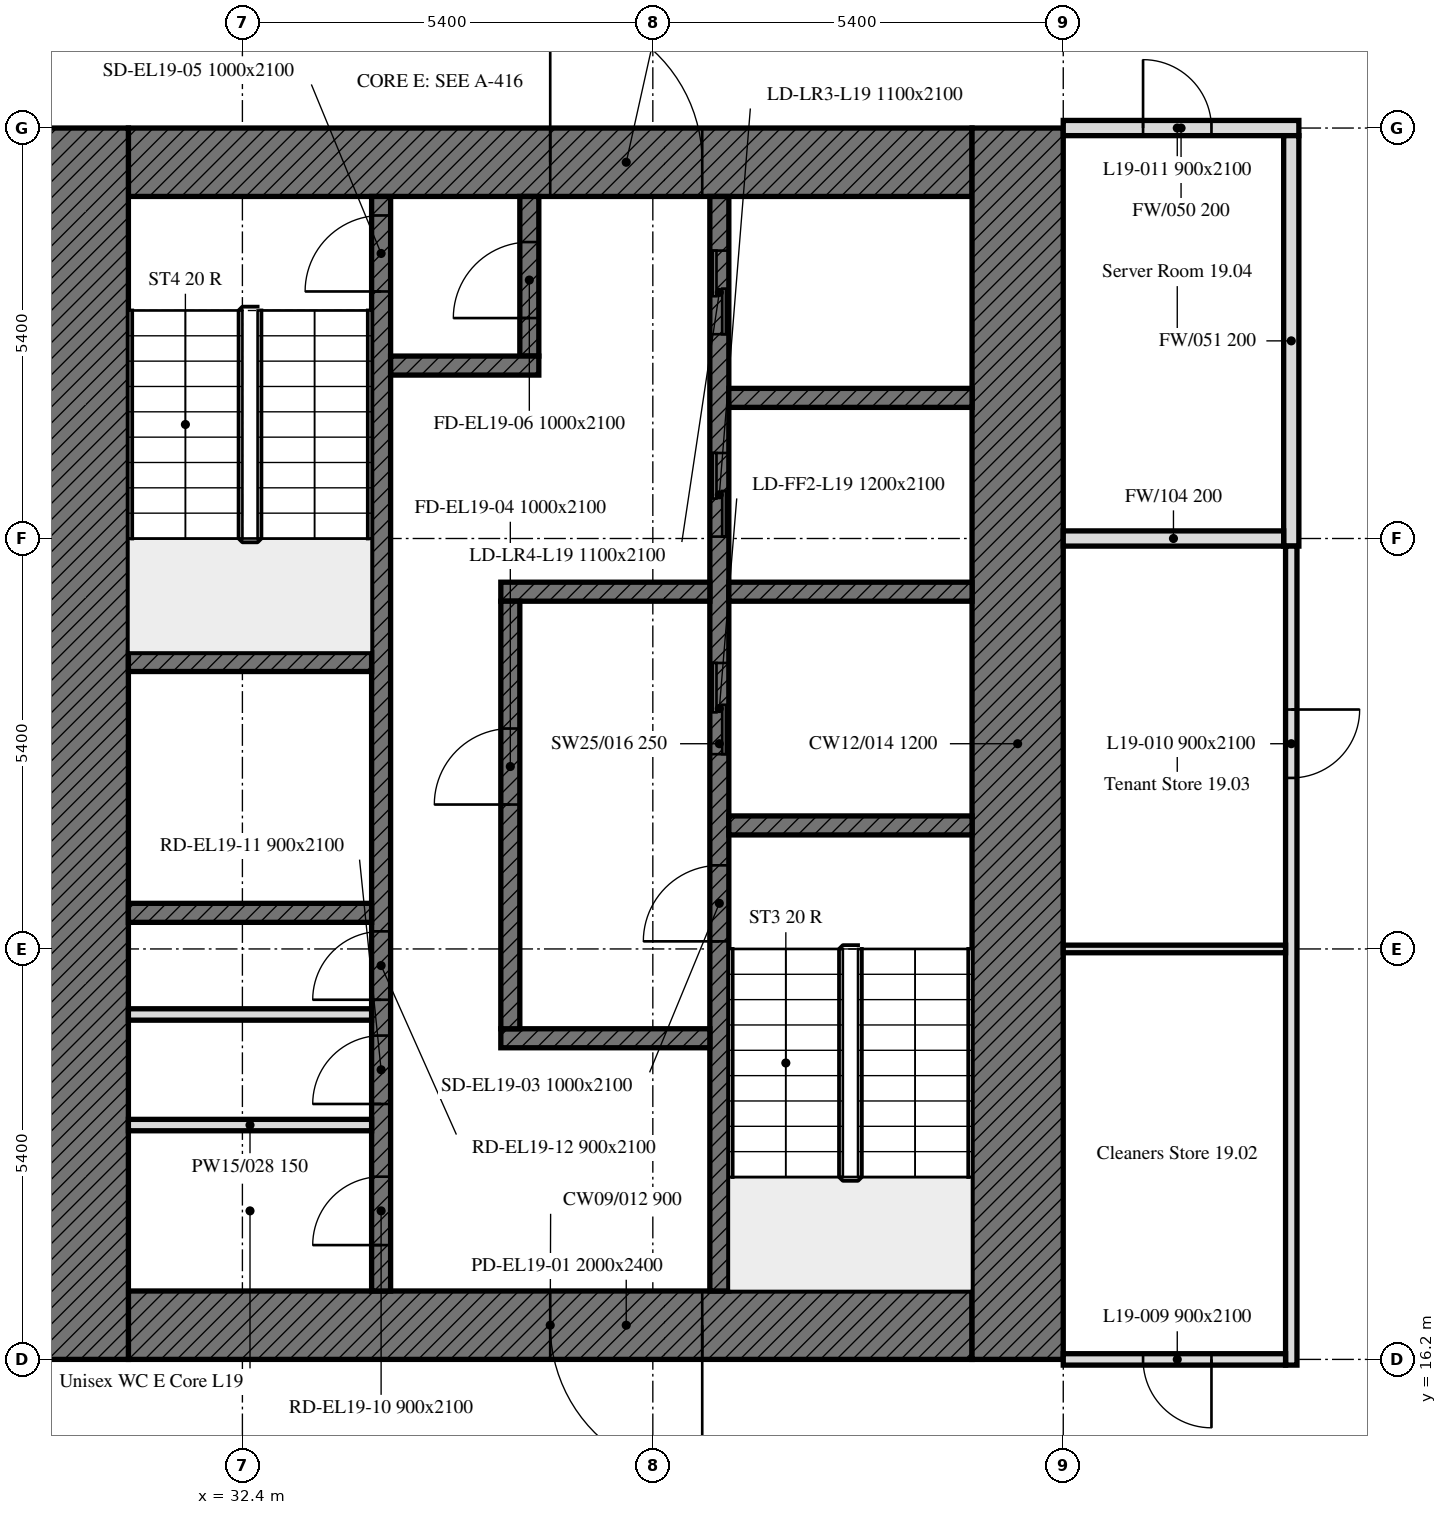
"""IFC4 building model, lengths in metres.
Left out: names, types, materials, properties, quantities, classifications, styles, units other than length and angle.
Written with IfcOpenShell. Run it as: python <this file> out.ifc"""

import sys

from ifc_helpers import new_model, si_unit, direction, frame, frame_2d, origin, place, context, subcontext, project, spatial, rectangle, extrude, element, fill, save


model = new_model("IFC4")
c1 = context("Model", 3, precision=1e-05, world=origin(), true_north=direction((0.0, 1.0)))
c2 = subcontext(c1, "Body", "Model", "MODEL_VIEW")
j1 = project(units=[si_unit("LENGTHUNIT", "METRE"), si_unit("PLANEANGLEUNIT", "RADIAN")], contexts=[c1])
p1 = place(None, origin())
s1 = spatial("IfcSite", under=j1, at=p1, CompositionType="ELEMENT")
p2 = place(p1, origin())
s2 = spatial("IfcBuilding", under=s1, at=p2, CompositionType="ELEMENT")
p3 = place(p2, frame((0.0, 0.0, 84.0)))
s3 = spatial("IfcBuildingStorey", under=s2, at=p3, CompositionType="ELEMENT", Elevation=84.0)
p4 = place(p3, frame((42.0, 16.65, 0.0), z_axis=(0.0, 0.0, 1.0), x_axis=(-1.0, 0.0, 0.0)))
e1 = element("IfcWall", 1, at=p4, inside=s3, PredefinedType="SOLIDWALL", context=c2, shape_type="SweptSolid", body=[
    extrude(rectangle(XDim=11.1, YDim=0.9, at=frame_2d((5.55, 0.0))), origin(), (0.0, 0.0, 1.0), 3.5),
])
p5 = place(p4, frame((3.55, 0.0, 0.0)))
e2 = element("IfcOpeningElement", 2, at=p5, cuts=e1, PredefinedType="OPENING", context=c2, shape_type="SweptSolid", body=[
    extrude(rectangle(XDim=2.0, YDim=2.4, at=frame_2d((1.0, 1.2))), frame((0.0, 0.45, 0.0), z_axis=(0.0, -1.0, 0.0), x_axis=(1.0, 0.0, 0.0)), (0.0, 0.0, 1.0), 0.9),
])
p6 = place(p3, frame((30.9, 31.95, 0.0), z_axis=(0.0, 0.0, 1.0), x_axis=(1.0, 0.0, 0.0)))
e3 = element("IfcWall", 3, at=p6, inside=s3, PredefinedType="SOLIDWALL", context=c2, shape_type="SweptSolid", body=[
    extrude(rectangle(XDim=11.1, YDim=0.9, at=frame_2d((5.55, 0.0))), origin(), (0.0, 0.0, 1.0), 3.5),
])
p7 = place(p6, frame((5.55, 0.0, 0.0)))
e4 = element("IfcOpeningElement", 4, at=p7, cuts=e3, PredefinedType="OPENING", context=c2, shape_type="SweptSolid", body=[
    extrude(rectangle(XDim=2.0, YDim=2.4, at=frame_2d((1.0, 1.2))), frame((0.0, 0.45, 0.0), z_axis=(0.0, -1.0, 0.0), x_axis=(1.0, 0.0, 0.0)), (0.0, 0.0, 1.0), 0.9),
])
for number, where, z_axis, x_axis in (
    (5, (42.6, 32.4, 0.0), (0.0, 0.0, 1.0), (0.0, -1.0, 0.0)),
    (6, (30.3, 16.2, 0.0), (0.0, 0.0, 1.0), (0.0, 1.0, 0.0)),
):
    element("IfcWall", number, at=place(p3, frame(where, z_axis=z_axis, x_axis=x_axis)), inside=s3, PredefinedType="SOLIDWALL", context=c2, shape_type="SweptSolid", body=[
        extrude(rectangle(XDim=16.2, YDim=1.2, at=frame_2d((8.1, 0.0))), origin(), (0.0, 0.0, 1.0), 3.5),
    ])
p8 = place(p3, frame((38.675, 17.1, 0.0), z_axis=(0.0, 0.0, 1.0), x_axis=(0.0, 1.0, 0.0)))
e7 = element("IfcWall", 7, at=p8, inside=s3, PredefinedType="SOLIDWALL", context=c2, shape_type="SweptSolid", body=[
    extrude(rectangle(XDim=14.4, YDim=0.25, at=frame_2d((7.2, 0.0))), origin(), (0.0, 0.0, 1.0), 3.5),
])
p9 = place(p8, frame((4.6, 0.0, 0.0)))
e8 = element("IfcOpeningElement", 8, at=p9, cuts=e7, PredefinedType="OPENING", context=c2, shape_type="SweptSolid", body=[
    extrude(rectangle(XDim=1.0, YDim=2.1, at=frame_2d((0.5, 1.05))), frame((0.0, 0.125, 0.0), z_axis=(0.0, -1.0, 0.0), x_axis=(1.0, 0.0, 0.0)), (0.0, 0.0, 1.0), 0.25),
])
p10 = place(p8, frame((7.062, 0.0, 0.0)))
e9 = element("IfcOpeningElement", 9, at=p10, cuts=e7, PredefinedType="OPENING", context=c2, shape_type="SweptSolid", body=[
    extrude(rectangle(XDim=1.2, YDim=2.1, at=frame_2d((0.6, 1.05))), frame((0.0, 0.125, 0.0), z_axis=(0.0, -1.0, 0.0), x_axis=(1.0, 0.0, 0.0)), (0.0, 0.0, 1.0), 0.25),
])
p11 = place(p8, frame((9.925, 0.0, 0.0)))
e10 = element("IfcOpeningElement", 10, at=p11, cuts=e7, PredefinedType="OPENING", context=c2, shape_type="SweptSolid", body=[
    extrude(rectangle(XDim=1.1, YDim=2.1, at=frame_2d((0.55, 1.05))), frame((0.0, 0.125, 0.0), z_axis=(0.0, -1.0, 0.0), x_axis=(1.0, 0.0, 0.0)), (0.0, 0.0, 1.0), 0.25),
])
p12 = place(p8, frame((12.587, 0.0, 0.0)))
e11 = element("IfcOpeningElement", 11, at=p12, cuts=e7, PredefinedType="OPENING", context=c2, shape_type="SweptSolid", body=[
    extrude(rectangle(XDim=1.1, YDim=2.1, at=frame_2d((0.55, 1.05))), frame((0.0, 0.125, 0.0), z_axis=(0.0, -1.0, 0.0), x_axis=(1.0, 0.0, 0.0)), (0.0, 0.0, 1.0), 0.25),
])
p13 = place(p3, frame((34.225, 17.1, 0.0), z_axis=(0.0, 0.0, 1.0), x_axis=(0.0, 1.0, 0.0)))
e12 = element("IfcWall", 12, at=p13, inside=s3, PredefinedType="SOLIDWALL", context=c2, shape_type="SweptSolid", body=[
    extrude(rectangle(XDim=14.4, YDim=0.25, at=frame_2d((7.2, 0.0))), origin(), (0.0, 0.0, 1.0), 3.5),
])
p14 = place(p13, frame((13.15, 0.0, 0.0)))
e13 = element("IfcOpeningElement", 13, at=p14, cuts=e12, PredefinedType="OPENING", context=c2, shape_type="SweptSolid", body=[
    extrude(rectangle(XDim=1.0, YDim=2.1, at=frame_2d((0.5, 1.05))), frame((0.0, 0.125, 0.0), z_axis=(0.0, -1.0, 0.0), x_axis=(1.0, 0.0, 0.0)), (0.0, 0.0, 1.0), 0.25),
])
p15 = place(p13, frame((0.604, 0.0, 0.0)))
e14 = element("IfcOpeningElement", 14, at=p15, cuts=e12, PredefinedType="OPENING", context=c2, shape_type="SweptSolid", body=[
    extrude(rectangle(XDim=0.9, YDim=2.1, at=frame_2d((0.45, 1.05))), frame((0.0, 0.125, 0.0), z_axis=(0.0, -1.0, 0.0), x_axis=(1.0, 0.0, 0.0)), (0.0, 0.0, 1.0), 0.25),
])
p16 = place(p13, frame((2.46, 0.0, 0.0)))
e15 = element("IfcOpeningElement", 15, at=p16, cuts=e12, PredefinedType="OPENING", context=c2, shape_type="SweptSolid", body=[
    extrude(rectangle(XDim=0.9, YDim=2.1, at=frame_2d((0.45, 1.05))), frame((0.0, 0.125, 0.0), z_axis=(0.0, -1.0, 0.0), x_axis=(1.0, 0.0, 0.0)), (0.0, 0.0, 1.0), 0.25),
])
p17 = place(p13, frame((3.832, 0.0, 0.0)))
e16 = element("IfcOpeningElement", 16, at=p17, cuts=e12, PredefinedType="OPENING", context=c2, shape_type="SweptSolid", body=[
    extrude(rectangle(XDim=0.9, YDim=2.1, at=frame_2d((0.45, 1.05))), frame((0.0, 0.125, 0.0), z_axis=(0.0, -1.0, 0.0), x_axis=(1.0, 0.0, 0.0)), (0.0, 0.0, 1.0), 0.25),
])
p18 = place(p3, frame((38.8, 23.225, 0.0), z_axis=(0.0, 0.0, 1.0), x_axis=(1.0, 0.0, 0.0)))
e17 = element("IfcWall", 17, at=p18, inside=s3, PredefinedType="SOLIDWALL", context=c2, shape_type="SweptSolid", body=[
    extrude(rectangle(XDim=3.2, YDim=0.25, at=frame_2d((1.6, 0.0))), origin(), (0.0, 0.0, 1.0), 3.5),
])
for number, where, z_axis, x_axis in (
    (18, (30.9, 25.375, 0.0), (0.0, 0.0, 1.0), (1.0, 0.0, 0.0)),
    (19, (30.9, 22.075, 0.0), (0.0, 0.0, 1.0), (1.0, 0.0, 0.0)),
):
    element("IfcWall", number, at=place(p3, frame(where, z_axis=z_axis, x_axis=x_axis)), inside=s3, PredefinedType="SOLIDWALL", context=c2, shape_type="SweptSolid", body=[
        extrude(rectangle(XDim=3.2, YDim=0.25, at=frame_2d((1.6, 0.0))), origin(), (0.0, 0.0, 1.0), 3.5),
    ])
p19 = place(p3, frame((38.8, 26.3, 0.0), z_axis=(0.0, 0.0, 1.0), x_axis=(1.0, 0.0, 0.0)))
e20 = element("IfcWall", 20, at=p19, inside=s3, PredefinedType="SOLIDWALL", context=c2, shape_type="SweptSolid", body=[
    extrude(rectangle(XDim=3.2, YDim=0.25, at=frame_2d((1.6, 0.0))), origin(), (0.0, 0.0, 1.0), 3.5),
])
for number, where, z_axis, x_axis in (
    (21, (35.8, 26.3, 0.0), (0.0, 0.0, 1.0), (1.0, 0.0, 0.0)),
    (22, (35.8, 20.425, 0.0), (0.0, 0.0, 1.0), (1.0, 0.0, 0.0)),
):
    element("IfcWall", number, at=place(p3, frame(where, z_axis=z_axis, x_axis=x_axis)), inside=s3, PredefinedType="SOLIDWALL", context=c2, shape_type="SweptSolid", body=[
        extrude(rectangle(XDim=2.75, YDim=0.25, at=frame_2d((1.375, 0.0))), origin(), (0.0, 0.0, 1.0), 3.5),
    ])
p20 = place(p3, frame((36.175, 29.4, 0.0), z_axis=(0.0, 0.0, 1.0), x_axis=(0.0, 1.0, 0.0)))
e23 = element("IfcWall", 23, at=p20, inside=s3, PredefinedType="SOLIDWALL", context=c2, shape_type="SweptSolid", body=[
    extrude(rectangle(XDim=2.1, YDim=0.25, at=frame_2d((1.05, 0.0))), origin(), (0.0, 0.0, 1.0), 3.5),
])
p21 = place(p20, frame((0.5, 0.0, 0.0)))
e24 = element("IfcOpeningElement", 24, at=p21, cuts=e23, PredefinedType="OPENING", context=c2, shape_type="SweptSolid", body=[
    extrude(rectangle(XDim=1.0, YDim=2.1, at=frame_2d((0.5, 1.05))), frame((0.0, 0.125, 0.0), z_axis=(0.0, -1.0, 0.0), x_axis=(1.0, 0.0, 0.0)), (0.0, 0.0, 1.0), 0.25),
])
p22 = place(p3, frame((34.35, 29.275, 0.0), z_axis=(0.0, 0.0, 1.0), x_axis=(1.0, 0.0, 0.0)))
e25 = element("IfcWall", 25, at=p22, inside=s3, PredefinedType="SOLIDWALL", context=c2, shape_type="SweptSolid", body=[
    extrude(rectangle(XDim=1.95, YDim=0.25, at=frame_2d((0.975, 0.0))), origin(), (0.0, 0.0, 1.0), 3.5),
])
p23 = place(p3, frame((35.925, 20.55, 0.0), z_axis=(0.0, 0.0, 1.0), x_axis=(0.0, 1.0, 0.0)))
e26 = element("IfcWall", 26, at=p23, inside=s3, PredefinedType="SOLIDWALL", context=c2, shape_type="SweptSolid", body=[
    extrude(rectangle(XDim=5.625, YDim=0.25, at=frame_2d((2.812, 0.0))), origin(), (0.0, 0.0, 1.0), 3.5),
])
p24 = place(p23, frame((2.95, 0.0, 0.0)))
e27 = element("IfcOpeningElement", 27, at=p24, cuts=e26, PredefinedType="OPENING", context=c2, shape_type="SweptSolid", body=[
    extrude(rectangle(XDim=1.0, YDim=2.1, at=frame_2d((0.5, 1.05))), frame((0.0, 0.125, 0.0), z_axis=(0.0, -1.0, 0.0), x_axis=(1.0, 0.0, 0.0)), (0.0, 0.0, 1.0), 0.25),
])
p25 = place(p3, frame((38.8, 28.85, 0.0), z_axis=(0.0, 0.0, 1.0), x_axis=(1.0, 0.0, 0.0)))
e28 = element("IfcWall", 28, at=p25, inside=s3, PredefinedType="SOLIDWALL", context=c2, shape_type="SweptSolid", body=[
    extrude(rectangle(XDim=3.2, YDim=0.25, at=frame_2d((1.6, 0.0))), origin(), (0.0, 0.0, 1.0), 3.5),
])
for number, where, z_axis, x_axis in (
    (29, (30.9, 19.283, 0.0), (0.0, 0.0, 1.0), (1.0, 0.0, 0.0)),
    (30, (30.9, 20.738, 0.0), (0.0, 0.0, 1.0), (1.0, 0.0, 0.0)),
):
    element("IfcWall", number, at=place(p3, frame(where, z_axis=z_axis, x_axis=x_axis)), inside=s3, PredefinedType="PARTITIONING", context=c2, shape_type="SweptSolid", body=[
        extrude(rectangle(XDim=3.2, YDim=0.15, at=frame_2d((1.6, 0.0))), origin(), (0.0, 0.0, 1.0), 3.5),
    ])
p26 = place(p3, frame((43.2, 32.4, 0.0), z_axis=(0.0, 0.0, 1.0), x_axis=(1.0, 0.0, 0.0)))
e31 = element("IfcWall", 31, at=p26, inside=s3, PredefinedType="PARTITIONING", context=c2, shape_type="SweptSolid", body=[
    extrude(rectangle(XDim=3.1, YDim=0.2, at=frame_2d((1.55, 0.0))), origin(), (0.0, 0.0, 1.0), 2.75),
])
p27 = place(p26, frame((1.05, 0.0, 0.0)))
e32 = element("IfcOpeningElement", 32, at=p27, cuts=e31, PredefinedType="OPENING", context=c2, shape_type="SweptSolid", body=[
    extrude(rectangle(XDim=0.9, YDim=2.1, at=frame_2d((0.45, 1.05))), frame((0.0, 0.1, 0.0), z_axis=(0.0, -1.0, 0.0), x_axis=(1.0, 0.0, 0.0)), (0.0, 0.0, 1.0), 0.2),
])
p28 = place(p3, frame((46.2, 32.3, 0.0), z_axis=(0.0, 0.0, 1.0), x_axis=(0.0, -1.0, 0.0)))
e33 = element("IfcWall", 33, at=p28, inside=s3, PredefinedType="PARTITIONING", context=c2, shape_type="SweptSolid", body=[
    extrude(rectangle(XDim=5.4, YDim=0.2, at=frame_2d((2.7, 0.0))), origin(), (0.0, 0.0, 1.0), 3.5),
])
p29 = place(p3, frame((46.2, 26.9, 0.0), z_axis=(0.0, 0.0, 1.0), x_axis=(0.0, -1.0, 0.0)))
e34 = element("IfcWall", 34, at=p29, inside=s3, PredefinedType="PARTITIONING", context=c2, shape_type="SweptSolid", body=[
    extrude(rectangle(XDim=10.775, YDim=0.15, at=frame_2d((5.387, 0.0))), origin(), (0.0, 0.0, 1.0), 3.5),
])
p30 = place(p29, frame((2.15, 0.0, 0.0)))
e35 = element("IfcOpeningElement", 35, at=p30, cuts=e34, PredefinedType="OPENING", context=c2, shape_type="SweptSolid", body=[
    extrude(rectangle(XDim=0.9, YDim=2.1, at=frame_2d((0.45, 1.05))), frame((0.0, 0.075, 0.0), z_axis=(0.0, -1.0, 0.0), x_axis=(1.0, 0.0, 0.0)), (0.0, 0.0, 1.0), 0.15),
])
p31 = place(p3, frame((46.125, 16.2, 0.0), z_axis=(0.0, 0.0, 1.0), x_axis=(-1.0, 0.0, 0.0)))
e36 = element("IfcWall", 36, at=p31, inside=s3, PredefinedType="PARTITIONING", context=c2, shape_type="SweptSolid", body=[
    extrude(rectangle(XDim=2.925, YDim=0.15, at=frame_2d((1.462, 0.0))), origin(), (0.0, 0.0, 1.0), 2.75),
])
p32 = place(p31, frame((0.975, 0.0, 0.0)))
e37 = element("IfcOpeningElement", 37, at=p32, cuts=e36, PredefinedType="OPENING", context=c2, shape_type="SweptSolid", body=[
    extrude(rectangle(XDim=0.9, YDim=2.1, at=frame_2d((0.45, 1.05))), frame((0.0, 0.075, 0.0), z_axis=(0.0, -1.0, 0.0), x_axis=(1.0, 0.0, 0.0)), (0.0, 0.0, 1.0), 0.15),
])
p33 = place(p3, frame((46.125, 21.6, 0.0), z_axis=(0.0, 0.0, 1.0), x_axis=(-1.0, 0.0, 0.0)))
e38 = element("IfcWall", 38, at=p33, inside=s3, PredefinedType="PARTITIONING", context=c2, shape_type="SweptSolid", body=[
    extrude(rectangle(XDim=2.925, YDim=0.1, at=frame_2d((1.462, 0.0))), origin(), (0.0, 0.0, 1.0), 2.75),
])
p34 = place(p3, frame((46.1, 27.0, 0.0), z_axis=(0.0, 0.0, 1.0), x_axis=(-1.0, 0.0, 0.0)))
e39 = element("IfcWall", 39, at=p34, inside=s3, PredefinedType="PARTITIONING", context=c2, shape_type="SweptSolid", body=[
    extrude(rectangle(XDim=2.9, YDim=0.2, at=frame_2d((1.45, 0.0))), origin(), (0.0, 0.0, 1.0), 2.75),
])
p35 = place(p5, origin())
e40 = element("IfcDoor", 40, at=p35, inside=s3, OperationType="DOUBLE_DOOR_SINGLE_SWING", PredefinedType="DOOR", context=c2, shape_type="SweptSolid", body=[
    extrude(rectangle(XDim=2.0, YDim=2.4, at=frame_2d((1.0, 1.2))), frame((0.0, 0.025, 0.0), z_axis=(0.0, -1.0, 0.0), x_axis=(1.0, 0.0, 0.0)), (0.0, 0.0, 1.0), 0.05),
])
fill(e2, e40)
p36 = place(p7, origin())
e41 = element("IfcDoor", 41, at=p36, inside=s3, OperationType="DOUBLE_DOOR_SINGLE_SWING", PredefinedType="DOOR", context=c2, shape_type="SweptSolid", body=[
    extrude(rectangle(XDim=2.0, YDim=2.4, at=frame_2d((1.0, 1.2))), frame((0.0, 0.025, 0.0), z_axis=(0.0, -1.0, 0.0), x_axis=(1.0, 0.0, 0.0)), (0.0, 0.0, 1.0), 0.05),
])
fill(e4, e41)
p37 = place(p9, origin())
e42 = element("IfcDoor", 42, at=p37, inside=s3, OperationType="SINGLE_SWING_LEFT", PredefinedType="DOOR", context=c2, shape_type="SweptSolid", body=[
    extrude(rectangle(XDim=1.0, YDim=2.1, at=frame_2d((0.5, 1.05))), frame((0.0, 0.025, 0.0), z_axis=(0.0, -1.0, 0.0), x_axis=(1.0, 0.0, 0.0)), (0.0, 0.0, 1.0), 0.05),
])
fill(e8, e42)
p38 = place(p24, origin())
e43 = element("IfcDoor", 43, at=p38, inside=s3, OperationType="SINGLE_SWING_LEFT", PredefinedType="DOOR", context=c2, shape_type="SweptSolid", body=[
    extrude(rectangle(XDim=1.0, YDim=2.1, at=frame_2d((0.5, 1.05))), frame((0.0, 0.025, 0.0), z_axis=(0.0, -1.0, 0.0), x_axis=(1.0, 0.0, 0.0)), (0.0, 0.0, 1.0), 0.05),
])
fill(e27, e43)
p39 = place(p14, origin())
e44 = element("IfcDoor", 44, at=p39, inside=s3, OperationType="SINGLE_SWING_LEFT", PredefinedType="DOOR", context=c2, shape_type="SweptSolid", body=[
    extrude(rectangle(XDim=1.0, YDim=2.1, at=frame_2d((0.5, 1.05))), frame((0.0, 0.025, 0.0), z_axis=(0.0, -1.0, 0.0), x_axis=(1.0, 0.0, 0.0)), (0.0, 0.0, 1.0), 0.05),
])
fill(e13, e44)
p40 = place(p21, origin())
e45 = element("IfcDoor", 45, at=p40, inside=s3, OperationType="SINGLE_SWING_LEFT", PredefinedType="DOOR", context=c2, shape_type="SweptSolid", body=[
    extrude(rectangle(XDim=1.0, YDim=2.1, at=frame_2d((0.5, 1.05))), frame((0.0, 0.025, 0.0), z_axis=(0.0, -1.0, 0.0), x_axis=(1.0, 0.0, 0.0)), (0.0, 0.0, 1.0), 0.05),
])
fill(e24, e45)
p41 = place(p10, origin())
e46 = element("IfcDoor", 46, at=p41, inside=s3, OperationType="DOUBLE_DOOR_SLIDING", PredefinedType="DOOR", context=c2, shape_type="SweptSolid", body=[
    extrude(rectangle(XDim=1.2, YDim=2.1, at=frame_2d((0.6, 1.05))), frame((0.0, 0.025, 0.0), z_axis=(0.0, -1.0, 0.0), x_axis=(1.0, 0.0, 0.0)), (0.0, 0.0, 1.0), 0.05),
])
fill(e9, e46)
p42 = place(p11, origin())
e47 = element("IfcDoor", 47, at=p42, inside=s3, OperationType="DOUBLE_DOOR_SLIDING", PredefinedType="DOOR", context=c2, shape_type="SweptSolid", body=[
    extrude(rectangle(XDim=1.1, YDim=2.1, at=frame_2d((0.55, 1.05))), frame((0.0, 0.025, 0.0), z_axis=(0.0, -1.0, 0.0), x_axis=(1.0, 0.0, 0.0)), (0.0, 0.0, 1.0), 0.05),
])
fill(e10, e47)
p43 = place(p12, origin())
e48 = element("IfcDoor", 48, at=p43, inside=s3, OperationType="DOUBLE_DOOR_SLIDING", PredefinedType="DOOR", context=c2, shape_type="SweptSolid", body=[
    extrude(rectangle(XDim=1.1, YDim=2.1, at=frame_2d((0.55, 1.05))), frame((0.0, 0.025, 0.0), z_axis=(0.0, -1.0, 0.0), x_axis=(1.0, 0.0, 0.0)), (0.0, 0.0, 1.0), 0.05),
])
fill(e11, e48)
p44 = place(p15, origin())
e49 = element("IfcDoor", 49, at=p44, inside=s3, OperationType="SINGLE_SWING_LEFT", PredefinedType="DOOR", context=c2, shape_type="SweptSolid", body=[
    extrude(rectangle(XDim=0.9, YDim=2.1, at=frame_2d((0.45, 1.05))), frame((0.0, 0.025, 0.0), z_axis=(0.0, -1.0, 0.0), x_axis=(1.0, 0.0, 0.0)), (0.0, 0.0, 1.0), 0.05),
])
fill(e14, e49)
p45 = place(p16, origin())
e50 = element("IfcDoor", 50, at=p45, inside=s3, OperationType="SINGLE_SWING_LEFT", PredefinedType="DOOR", context=c2, shape_type="SweptSolid", body=[
    extrude(rectangle(XDim=0.9, YDim=2.1, at=frame_2d((0.45, 1.05))), frame((0.0, 0.025, 0.0), z_axis=(0.0, -1.0, 0.0), x_axis=(1.0, 0.0, 0.0)), (0.0, 0.0, 1.0), 0.05),
])
fill(e15, e50)
p46 = place(p17, origin())
e51 = element("IfcDoor", 51, at=p46, inside=s3, OperationType="SINGLE_SWING_LEFT", PredefinedType="DOOR", context=c2, shape_type="SweptSolid", body=[
    extrude(rectangle(XDim=0.9, YDim=2.1, at=frame_2d((0.45, 1.05))), frame((0.0, 0.025, 0.0), z_axis=(0.0, -1.0, 0.0), x_axis=(1.0, 0.0, 0.0)), (0.0, 0.0, 1.0), 0.05),
])
fill(e16, e51)
p47 = place(p32, origin())
e52 = element("IfcDoor", 52, at=p47, inside=s3, OperationType="SINGLE_SWING_LEFT", PredefinedType="DOOR", context=c2, shape_type="SweptSolid", body=[
    extrude(rectangle(XDim=0.9, YDim=2.1, at=frame_2d((0.45, 1.05))), frame((0.0, 0.025, 0.0), z_axis=(0.0, -1.0, 0.0), x_axis=(1.0, 0.0, 0.0)), (0.0, 0.0, 1.0), 0.05),
])
fill(e37, e52)
p48 = place(p30, origin())
e53 = element("IfcDoor", 53, at=p48, inside=s3, OperationType="SINGLE_SWING_LEFT", PredefinedType="DOOR", context=c2, shape_type="SweptSolid", body=[
    extrude(rectangle(XDim=0.9, YDim=2.1, at=frame_2d((0.45, 1.05))), frame((0.0, 0.025, 0.0), z_axis=(0.0, -1.0, 0.0), x_axis=(1.0, 0.0, 0.0)), (0.0, 0.0, 1.0), 0.05),
])
fill(e35, e53)
p49 = place(p27, origin())
e54 = element("IfcDoor", 54, at=p49, inside=s3, OperationType="SINGLE_SWING_LEFT", PredefinedType="DOOR", context=c2, shape_type="SweptSolid", body=[
    extrude(rectangle(XDim=0.9, YDim=2.1, at=frame_2d((0.45, 1.05))), frame((0.0, 0.025, 0.0), z_axis=(0.0, -1.0, 0.0), x_axis=(1.0, 0.0, 0.0)), (0.0, 0.0, 1.0), 0.05),
])
fill(e32, e54)
save(model, sys.argv[1])
